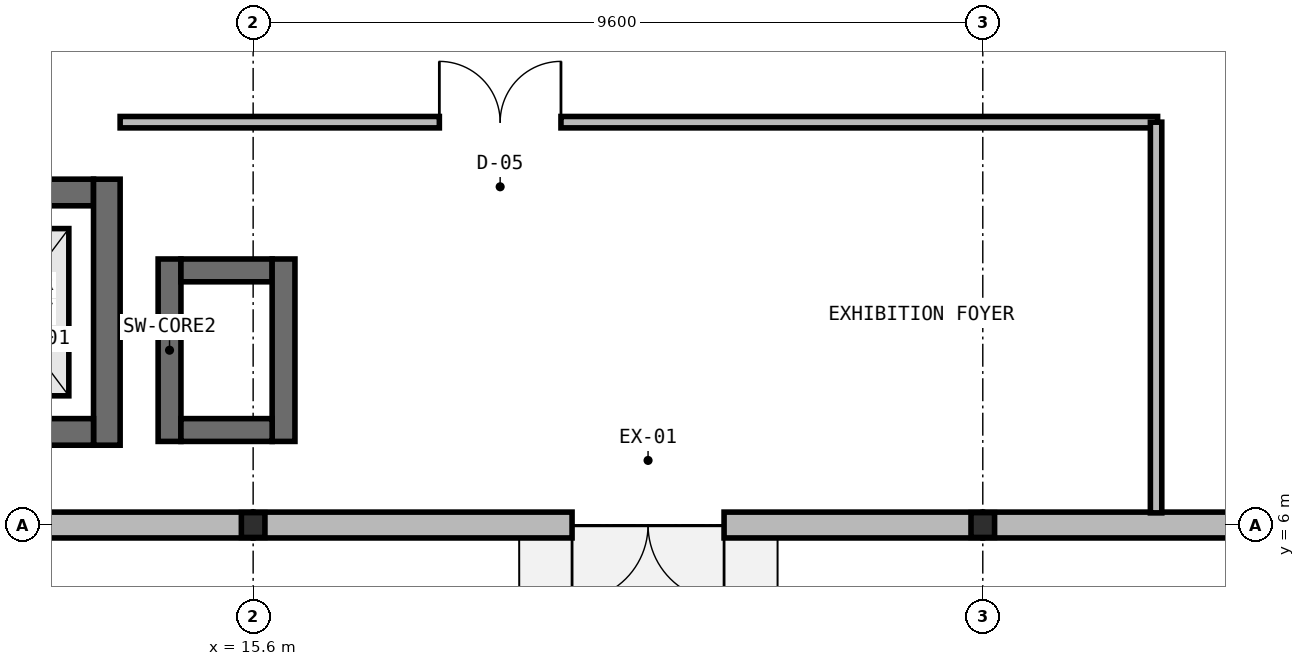
"""IFC4 building model, lengths in metres.
Left out: names, types, materials, properties, quantities, classifications, styles, units other than length and angle.
Written with IfcOpenShell. Run it as: python <this file> out.ifc"""

import sys

from ifc_helpers import new_model, si_unit, direction, frame, frame_2d, origin, origin_2d, place, context, subcontext, project, spatial, rectangle, i_section, extrude, element, fill, save


model = new_model("IFC4")
c1 = context("Model", 3, precision=1e-05, world=origin(), true_north=direction((0.0, 1.0)))
c2 = subcontext(c1, "Body", "Model", "MODEL_VIEW")
j1 = project(units=[si_unit("LENGTHUNIT", "METRE"), si_unit("PLANEANGLEUNIT", "RADIAN")], contexts=[c1])
p1 = place(None, origin())
s1 = spatial("IfcSite", under=j1, at=p1, CompositionType="ELEMENT")
p2 = place(p1, origin())
s2 = spatial("IfcBuilding", under=s1, at=p2, CompositionType="ELEMENT")
p3 = place(p2, origin())
s3 = spatial("IfcBuildingStorey", under=s2, at=p3, CompositionType="ELEMENT", Elevation=0.0)
p4 = place(p3, frame((11.2, 10.375, 0.0), z_axis=(0.0, 0.0, 1.0), x_axis=(1.0, 0.0, 0.0)))
e1 = element("IfcWall", 1, at=p4, inside=s3, PredefinedType="SHEAR", context=c2, shape_type="SweptSolid", body=[
    extrude(rectangle(XDim=2.3, YDim=0.35, at=frame_2d((1.15, 0.0))), origin(), (0.0, 0.0, 1.0), 5.25),
])
p5 = place(p4, frame((0.6, 0.0, 0.0)))
e2 = element("IfcOpeningElement", 2, at=p5, cuts=e1, PredefinedType="OPENING", context=c2, shape_type="SweptSolid", body=[
    extrude(rectangle(XDim=1.1, YDim=2.15, at=frame_2d((0.55, 1.075))), frame((0.0, 0.185, 0.0), z_axis=(0.0, -1.0, 0.0), x_axis=(1.0, 0.0, 0.0)), (0.0, 0.0, 1.0), 0.37),
])
p6 = place(p3, frame((13.675, 10.55, 0.0), z_axis=(0.0, 0.0, 1.0), x_axis=(0.0, -1.0, 0.0)))
e3 = element("IfcWall", 3, at=p6, inside=s3, PredefinedType="SHEAR", context=c2, shape_type="SweptSolid", body=[
    extrude(rectangle(XDim=3.5, YDim=0.35, at=frame_2d((1.75, 0.0))), origin(), (0.0, 0.0, 1.0), 5.25),
])
p7 = place(p3, frame((13.5, 7.225, 0.0), z_axis=(0.0, 0.0, 1.0), x_axis=(-1.0, 0.0, 0.0)))
e4 = element("IfcWall", 4, at=p7, inside=s3, PredefinedType="SHEAR", context=c2, shape_type="SweptSolid", body=[
    extrude(rectangle(XDim=2.3, YDim=0.35, at=frame_2d((1.15, 0.0))), origin(), (0.0, 0.0, 1.0), 5.25),
])
for number, where, z_axis, x_axis in (
    (5, (15.6, 6.0, 0.0), (0.0, 0.0, 1.0), (1.0, 0.0, 0.0)),
    (6, (25.2, 6.0, 0.0), (0.0, 0.0, 1.0), (1.0, 0.0, 0.0)),
):
    element("IfcColumn", number, at=place(p3, frame(where, z_axis=z_axis, x_axis=x_axis)), inside=s3, PredefinedType="COLUMN", context=c2, shape_type="SweptSolid", body=[
        extrude(i_section(OverallWidth=0.31, OverallDepth=0.327, WebThickness=0.016, FlangeThickness=0.025, at=origin_2d()), origin(), (0.0, 0.0, 1.0), 5.25),
    ])
p8 = place(p3, frame((14.5, 7.1, 0.0), z_axis=(0.0, 0.0, 1.0), x_axis=(0.0, 1.0, 0.0)))
e7 = element("IfcWall", 7, at=p8, inside=s3, PredefinedType="SHEAR", context=c2, shape_type="SweptSolid", body=[
    extrude(rectangle(XDim=2.4, YDim=0.3, at=frame_2d((1.2, 0.0))), origin(), (0.0, 0.0, 1.0), 5.07),
])
p9 = place(p3, frame((14.65, 9.35, 0.0), z_axis=(0.0, 0.0, 1.0), x_axis=(1.0, 0.0, 0.0)))
e8 = element("IfcWall", 8, at=p9, inside=s3, PredefinedType="SHEAR", context=c2, shape_type="SweptSolid", body=[
    extrude(rectangle(XDim=1.2, YDim=0.3, at=frame_2d((0.6, 0.0))), origin(), (0.0, 0.0, 1.0), 5.07),
])
p10 = place(p3, frame((16.0, 9.5, 0.0), z_axis=(0.0, 0.0, 1.0), x_axis=(0.0, -1.0, 0.0)))
e9 = element("IfcWall", 9, at=p10, inside=s3, PredefinedType="SHEAR", context=c2, shape_type="SweptSolid", body=[
    extrude(rectangle(XDim=2.4, YDim=0.3, at=frame_2d((1.2, 0.0))), origin(), (0.0, 0.0, 1.0), 5.07),
])
p11 = place(p3, frame((15.85, 7.25, 0.0), z_axis=(0.0, 0.0, 1.0), x_axis=(-1.0, 0.0, 0.0)))
e10 = element("IfcWall", 10, at=p11, inside=s3, PredefinedType="SHEAR", context=c2, shape_type="SweptSolid", body=[
    extrude(rectangle(XDim=1.2, YDim=0.3, at=frame_2d((0.6, 0.0))), origin(), (0.0, 0.0, 1.0), 5.07),
])
p12 = place(p3, frame((15.596, 6.0, 0.0), z_axis=(0.0, 0.0, 1.0), x_axis=(-1.0, 0.0, 0.0)))
e11 = element("IfcWall", 11, at=p12, inside=s3, PredefinedType="SOLIDWALL", context=c2, shape_type="SweptSolid", body=[
    extrude(rectangle(XDim=9.766, YDim=0.34, at=frame_2d((4.883, 0.0))), origin(), (0.0, 0.0, 1.0), 4.584),
])
p13 = place(p12, frame((6.2, 0.0, 0.0)))
e12 = element("IfcOpeningElement", 12, at=p13, cuts=e11, PredefinedType="OPENING", context=c2, shape_type="SweptSolid", body=[
    extrude(rectangle(XDim=1.8, YDim=2.25, at=frame_2d((0.9, 1.125))), frame((0.0, 0.18, 0.0), z_axis=(0.0, -1.0, 0.0), x_axis=(1.0, 0.0, 0.0)), (0.0, 0.0, 1.0), 0.36),
])
p14 = place(p3, frame((25.196, 6.0, 0.0), z_axis=(0.0, 0.0, 1.0), x_axis=(-1.0, 0.0, 0.0)))
e13 = element("IfcWall", 13, at=p14, inside=s3, PredefinedType="SOLIDWALL", context=c2, shape_type="SweptSolid", body=[
    extrude(rectangle(XDim=9.592, YDim=0.34, at=frame_2d((4.796, 0.0))), origin(), (0.0, 0.0, 1.0), 4.584),
])
p15 = place(p14, frame((3.4, 0.0, 0.0)))
e14 = element("IfcOpeningElement", 14, at=p15, cuts=e13, PredefinedType="OPENING", context=c2, shape_type="SweptSolid", body=[
    extrude(rectangle(XDim=2.0, YDim=2.3, at=frame_2d((1.0, 1.15))), frame((0.0, 0.18, 0.0), z_axis=(0.0, -1.0, 0.0), x_axis=(1.0, 0.0, 0.0)), (0.0, 0.0, 1.0), 0.36),
])
p16 = place(p3, frame((34.97, 6.0, 0.0), z_axis=(0.0, 0.0, 1.0), x_axis=(-1.0, 0.0, 0.0)))
e15 = element("IfcWall", 15, at=p16, inside=s3, PredefinedType="SOLIDWALL", context=c2, shape_type="SweptSolid", body=[
    extrude(rectangle(XDim=9.766, YDim=0.34, at=frame_2d((4.883, 0.0))), origin(), (0.0, 0.0, 1.0), 4.584),
])
p17 = place(p16, frame((1.201, 0.0, 0.95)))
e16 = element("IfcOpeningElement", 16, at=p17, cuts=e15, PredefinedType="OPENING", context=c2, shape_type="SweptSolid", body=[
    extrude(rectangle(XDim=2.48, YDim=1.86, at=frame_2d((1.24, 0.93))), frame((0.0, 0.18, 0.0), z_axis=(0.0, -1.0, 0.0), x_axis=(1.0, 0.0, 0.0)), (0.0, 0.0, 1.0), 0.36),
])
p18 = place(p3, frame((13.85, 11.3, 0.0), z_axis=(0.0, 0.0, 1.0), x_axis=(1.0, 0.0, 0.0)))
e17 = element("IfcWall", 17, at=p18, inside=s3, PredefinedType="PARTITIONING", context=c2, shape_type="SweptSolid", body=[
    extrude(rectangle(XDim=13.65, YDim=0.15, at=frame_2d((6.825, 0.0))), origin(), (0.0, 0.0, 1.0), 4.93),
])
p19 = place(p18, frame((4.2, 0.0, 0.0)))
e18 = element("IfcOpeningElement", 18, at=p19, cuts=e17, PredefinedType="OPENING", context=c2, shape_type="SweptSolid", body=[
    extrude(rectangle(XDim=1.6, YDim=2.2, at=frame_2d((0.8, 1.1))), frame((0.0, 0.085, 0.0), z_axis=(0.0, -1.0, 0.0), x_axis=(1.0, 0.0, 0.0)), (0.0, 0.0, 1.0), 0.17),
])
p20 = place(p3, frame((27.48, 6.16, 0.0), z_axis=(0.0, 0.0, 1.0), x_axis=(0.0, 1.0, 0.0)))
e19 = element("IfcWall", 19, at=p20, inside=s3, PredefinedType="PARTITIONING", context=c2, shape_type="SweptSolid", body=[
    extrude(rectangle(XDim=5.14, YDim=0.15, at=frame_2d((2.57, 0.0))), origin(), (0.0, 0.0, 1.0), 4.93),
])
p21 = place(p15, origin())
e20 = element("IfcDoor", 20, at=p21, inside=s3, OperationType="DOUBLE_DOOR_SINGLE_SWING", PredefinedType="DOOR", context=c2, shape_type="SweptSolid", body=[
    extrude(rectangle(XDim=2.0, YDim=2.3, at=frame_2d((1.0, 1.15))), frame((0.0, 0.025, 0.0), z_axis=(0.0, -1.0, 0.0), x_axis=(1.0, 0.0, 0.0)), (0.0, 0.0, 1.0), 0.05),
])
fill(e14, e20)
p22 = place(p19, origin())
e21 = element("IfcDoor", 21, at=p22, inside=s3, OperationType="DOUBLE_DOOR_SINGLE_SWING", PredefinedType="DOOR", context=c2, shape_type="SweptSolid", body=[
    extrude(rectangle(XDim=1.6, YDim=2.2, at=frame_2d((0.8, 1.1))), frame((0.0, 0.025, 0.0), z_axis=(0.0, -1.0, 0.0), x_axis=(1.0, 0.0, 0.0)), (0.0, 0.0, 1.0), 0.05),
])
fill(e18, e21)
save(model, sys.argv[1])
